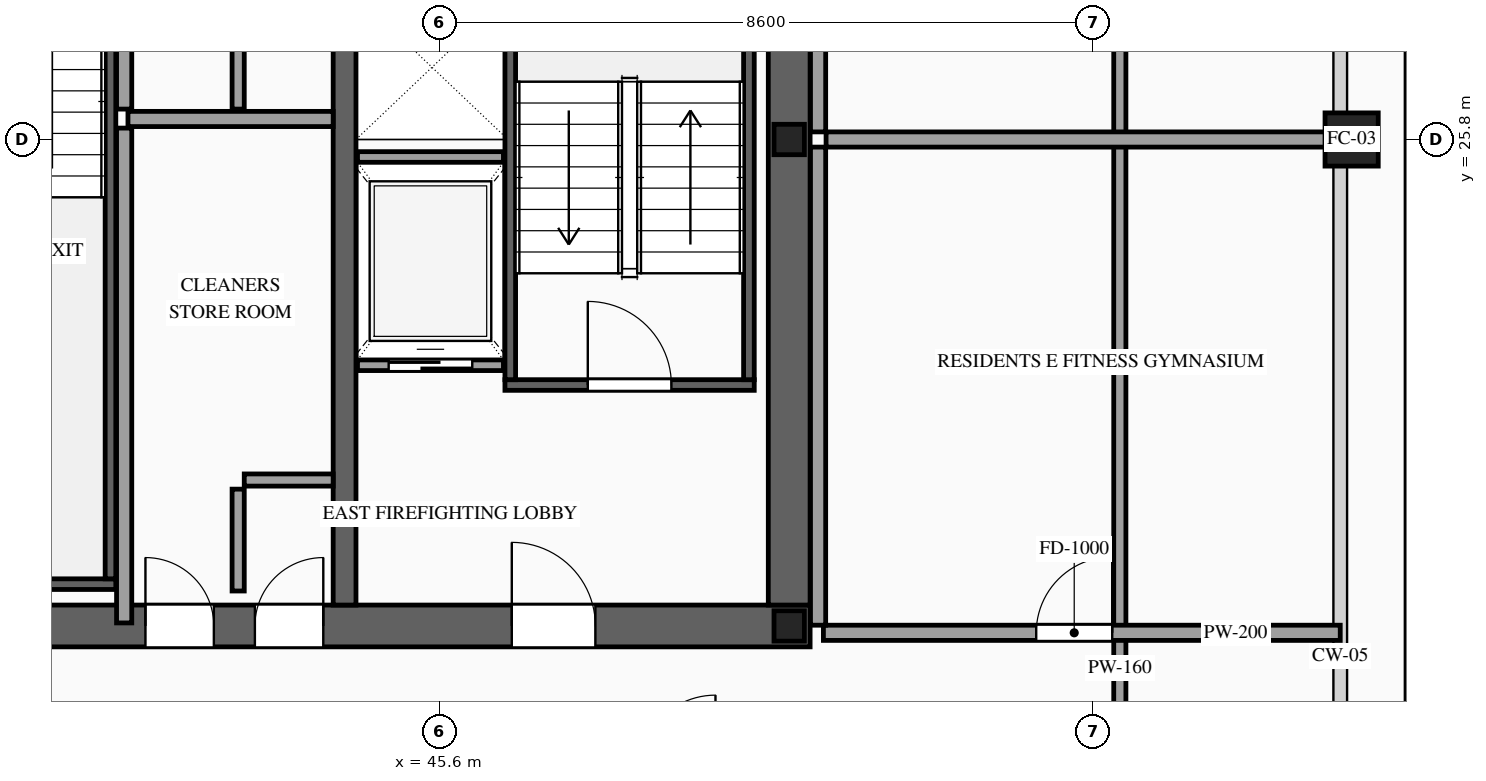
"""IFC4 building model, lengths in metres.
Left out: names, types, materials, properties, quantities, classifications, styles, units other than length and angle.
Written with IfcOpenShell. Run it as: python <this file> out.ifc"""

import sys

from ifc_helpers import new_model, si_unit, direction, frame, frame_2d, origin, origin_2d, place, context, subcontext, project, spatial, rectangle, hollow_rectangle, i_section, extrude, source, transform, mapped, element, fill, save


model = new_model("IFC4")
c1 = context("Model", 3, precision=1e-05, world=origin(), true_north=direction((0.0, 1.0)))
c2 = subcontext(c1, "Body", "Model", "MODEL_VIEW")
j1 = project(units=[si_unit("LENGTHUNIT", "METRE"), si_unit("PLANEANGLEUNIT", "RADIAN")], contexts=[c1])
p1 = place(None, origin())
s1 = spatial("IfcSite", under=j1, at=p1, CompositionType="ELEMENT")
p2 = place(p1, origin())
s2 = spatial("IfcBuilding", under=s1, at=p2, CompositionType="ELEMENT")
p3 = place(p2, frame((0.0, 0.0, 241.6)))
s3 = spatial("IfcBuildingStorey", under=s2, at=p3, CompositionType="ELEMENT", Elevation=241.6)
p4 = place(p3, frame((23.525, 19.4, 0.0), z_axis=(0.0, 0.0, 1.0), x_axis=(1.0, 0.0, 0.0)))
e1 = element("IfcWall", 1, at=p4, inside=s3, PredefinedType="SHEAR", context=c2, shape_type="SweptSolid", body=[
    extrude(rectangle(XDim=26.95, YDim=0.55, at=frame_2d((13.475, 0.0))), origin(), (0.0, 0.0, 1.0), 3.5),
])
p5 = place(p4, frame((1.925, 0.0, 0.0)))
e2 = element("IfcOpeningElement", 2, at=p5, cuts=e1, PredefinedType="OPENING", context=c2, shape_type="SweptSolid", body=[
    extrude(rectangle(XDim=1.1, YDim=2.2, at=frame_2d((0.55, 1.1))), frame((0.0, 0.29, 0.0), z_axis=(0.0, -1.0, 0.0), x_axis=(1.0, 0.0, 0.0)), (0.0, 0.0, 1.0), 0.58),
])
p6 = place(p4, frame((9.825, 0.0, 0.0)))
e3 = element("IfcOpeningElement", 3, at=p6, cuts=e1, PredefinedType="OPENING", context=c2, shape_type="SweptSolid", body=[
    extrude(rectangle(XDim=1.1, YDim=2.2, at=frame_2d((0.55, 1.1))), frame((0.0, 0.29, 0.0), z_axis=(0.0, -1.0, 0.0), x_axis=(1.0, 0.0, 0.0)), (0.0, 0.0, 1.0), 0.58),
])
p7 = place(p4, frame((23.025, 0.0, 0.0)))
e4 = element("IfcOpeningElement", 4, at=p7, cuts=e1, PredefinedType="OPENING", context=c2, shape_type="SweptSolid", body=[
    extrude(rectangle(XDim=1.1, YDim=2.2, at=frame_2d((0.55, 1.1))), frame((0.0, 0.29, 0.0), z_axis=(0.0, -1.0, 0.0), x_axis=(1.0, 0.0, 0.0)), (0.0, 0.0, 1.0), 0.58),
])
p8 = place(p4, frame((19.645, 0.0, 0.0)))
e5 = element("IfcOpeningElement", 5, at=p8, cuts=e1, PredefinedType="OPENING", context=c2, shape_type="SweptSolid", body=[
    extrude(rectangle(XDim=0.9, YDim=2.15, at=frame_2d((0.45, 1.075))), frame((0.0, 0.29, 0.0), z_axis=(0.0, -1.0, 0.0), x_axis=(1.0, 0.0, 0.0)), (0.0, 0.0, 1.0), 0.58),
])
p9 = place(p4, frame((18.205, 0.0, 0.0)))
e6 = element("IfcOpeningElement", 6, at=p9, cuts=e1, PredefinedType="OPENING", context=c2, shape_type="SweptSolid", body=[
    extrude(rectangle(XDim=0.9, YDim=2.15, at=frame_2d((0.45, 1.075))), frame((0.0, 0.29, 0.0), z_axis=(0.0, -1.0, 0.0), x_axis=(1.0, 0.0, 0.0)), (0.0, 0.0, 1.0), 0.58),
])
m1 = source(origin(), c2, "Body", "SweptSolid", [
    extrude(rectangle(XDim=12.25, YDim=0.55, at=frame_2d((6.125, 0.0))), origin(), (0.0, 0.0, 1.0), 3.5),
])
p10 = place(p3, frame((50.2, 19.675, 0.0), z_axis=(0.0, 0.0, 1.0), x_axis=(0.0, 1.0, 0.0)))
e7 = element("IfcWall", 7, at=p10, inside=s3, PredefinedType="SHEAR", context=c2, shape_type="MappedRepresentation", body=[
    mapped(m1, transform((0.0, 0.0, 0.0), scale=1.0)),
])
m2 = source(origin(), c2, "Body", "SweptSolid", [
    extrude(rectangle(XDim=12.25, YDim=0.3, at=frame_2d((6.125, 0.0))), origin(), (0.0, 0.0, 1.0), 3.5),
])
p11 = place(p3, frame((44.35, 19.675, 0.0), z_axis=(0.0, 0.0, 1.0), x_axis=(0.0, 1.0, 0.0)))
e8 = element("IfcWall", 8, at=p11, inside=s3, PredefinedType="SOLIDWALL", context=c2, shape_type="MappedRepresentation", body=[
    mapped(m2, transform((0.0, 0.0, 0.0), scale=1.0)),
])
m3 = source(origin(), c2, "Body", "SweptSolid", [
    extrude(i_section(OverallWidth=0.4, OverallDepth=0.4, WebThickness=0.013, FlangeThickness=0.021, at=origin_2d()), origin(), (0.0, 0.0, 1.0), 3.5),
])
for number, where, z_axis, x_axis in (
    (9, (50.2, 19.4, 0.0), (0.0, 0.0, 1.0), (1.0, 0.0, 0.0)),
    (10, (50.2, 25.8, 0.0), (0.0, 0.0, 1.0), (1.0, 0.0, 0.0)),
):
    element("IfcColumn", number, at=place(p3, frame(where, z_axis=z_axis, x_axis=x_axis)), inside=s3, PredefinedType="COLUMN", context=c2, shape_type="MappedRepresentation", body=[
        mapped(m3, transform((0.0, 0.0, 0.0), scale=1.0)),
    ])
m4 = source(origin(), c2, "Body", "SweptSolid", [
    extrude(hollow_rectangle(XDim=0.7, YDim=0.7, WallThickness=0.032, at=origin_2d()), origin(), (0.0, 0.0, 1.0), 3.5),
])
p12 = place(p3, frame((57.6, 25.8, 0.0), z_axis=(0.0, 0.0, 1.0), x_axis=(1.0, 0.0, 0.0)))
e11 = element("IfcColumn", 11, at=p12, inside=s3, PredefinedType="COLUMN", context=c2, shape_type="MappedRepresentation", body=[
    mapped(m4, transform((0.0, 0.0, 0.0), scale=1.0)),
])
p13 = place(p3, frame((44.52, 22.83, 0.0), z_axis=(0.0, 0.0, 1.0), x_axis=(1.0, 0.0, 0.0)))
e12 = element("IfcWall", 12, at=p13, inside=s3, PredefinedType="SOLIDWALL", context=c2, shape_type="SweptSolid", body=[
    extrude(rectangle(XDim=1.92, YDim=0.14, at=frame_2d((0.96, 0.0))), origin(), (0.0, 0.0, 1.0), 3.28),
])
p14 = place(p13, frame((0.41, 0.0, 0.0)))
e13 = element("IfcOpeningElement", 13, at=p14, cuts=e12, PredefinedType="OPENING", context=c2, shape_type="SweptSolid", body=[
    extrude(rectangle(XDim=1.1, YDim=2.2, at=frame_2d((0.55, 1.1))), frame((0.0, 0.085, 0.0), z_axis=(0.0, -1.0, 0.0), x_axis=(1.0, 0.0, 0.0)), (0.0, 0.0, 1.0), 0.17),
])
m5 = source(origin(), c2, "Body", "SweptSolid", [
    extrude(rectangle(XDim=1.92, YDim=0.14, at=frame_2d((0.96, 0.0))), origin(), (0.0, 0.0, 1.0), 3.28),
])
p15 = place(p3, frame((44.52, 25.57, 0.0), z_axis=(0.0, 0.0, 1.0), x_axis=(1.0, 0.0, 0.0)))
e14 = element("IfcWall", 14, at=p15, inside=s3, PredefinedType="SOLIDWALL", context=c2, shape_type="MappedRepresentation", body=[
    mapped(m5, transform((0.0, 0.0, 0.0), scale=1.0)),
])
p16 = place(p3, frame((46.46, 22.57, 0.0), z_axis=(0.0, 0.0, 1.0), x_axis=(1.0, 0.0, 0.0)))
e15 = element("IfcWall", 15, at=p16, inside=s3, PredefinedType="SOLIDWALL", context=c2, shape_type="SweptSolid", body=[
    extrude(rectangle(XDim=3.28, YDim=0.14, at=frame_2d((1.64, 0.0))), origin(), (0.0, 0.0, 1.0), 3.28),
])
p17 = place(p16, frame((1.09, 0.0, 0.0)))
e16 = element("IfcOpeningElement", 16, at=p17, cuts=e15, PredefinedType="OPENING", context=c2, shape_type="SweptSolid", body=[
    extrude(rectangle(XDim=1.1, YDim=2.2, at=frame_2d((0.55, 1.1))), frame((0.0, 0.085, 0.0), z_axis=(0.0, -1.0, 0.0), x_axis=(1.0, 0.0, 0.0)), (0.0, 0.0, 1.0), 0.17),
])
m6 = source(origin(), c2, "Body", "SweptSolid", [
    extrude(rectangle(XDim=8.94, YDim=0.14, at=frame_2d((4.47, 0.0))), origin(), (0.0, 0.0, 1.0), 3.28),
])
for number, where, z_axis, x_axis in (
    (17, (46.53, 22.64, 0.0), (0.0, 0.0, 1.0), (0.0, 1.0, 0.0)),
    (18, (49.67, 22.64, 0.0), (0.0, 0.0, 1.0), (0.0, 1.0, 0.0)),
):
    element("IfcWall", number, at=place(p3, frame(where, z_axis=z_axis, x_axis=x_axis)), inside=s3, PredefinedType="SOLIDWALL", context=c2, shape_type="MappedRepresentation", body=[
        mapped(m6, transform((0.0, 0.0, 0.0), scale=1.0)),
    ])
m7 = source(origin(), c2, "Body", "SweptSolid", [
    extrude(rectangle(XDim=3.14, YDim=0.14, at=frame_2d((1.57, 0.0))), origin(), (0.0, 0.0, 1.0), 3.28),
])
p18 = place(p3, frame((38.2, 19.95, 0.0), z_axis=(0.0, 0.0, 1.0), x_axis=(1.0, 0.0, 0.0)))
e19 = element("IfcWall", 19, at=p18, inside=s3, PredefinedType="SOLIDWALL", context=c2, shape_type="MappedRepresentation", body=[
    mapped(m7, transform((0.0, 0.0, 0.0), scale=1.0)),
])
m8 = source(origin(), c2, "Body", "SweptSolid", [
    extrude(rectangle(XDim=8.94, YDim=0.14, at=frame_2d((4.47, 0.0))), origin(), (0.0, 0.0, 1.0), 3.28),
])
p19 = place(p3, frame((41.27, 20.02, 0.0), z_axis=(0.0, 0.0, 1.0), x_axis=(0.0, 1.0, 0.0)))
e20 = element("IfcWall", 20, at=p19, inside=s3, PredefinedType="SOLIDWALL", context=c2, shape_type="MappedRepresentation", body=[
    mapped(m8, transform((0.0, 0.0, 0.0), scale=1.0)),
])
m9 = source(origin(), c2, "Body", "SweptSolid", [
    extrude(rectangle(XDim=1.34, YDim=0.16, at=frame_2d((0.67, 0.0))), origin(), (0.0, 0.0, 1.0), 3.28),
])
p20 = place(p3, frame((42.95, 19.86, 0.0), z_axis=(0.0, 0.0, 1.0), x_axis=(0.0, 1.0, 0.0)))
e21 = element("IfcWall", 21, at=p20, inside=s3, PredefinedType="PARTITIONING", context=c2, shape_type="MappedRepresentation", body=[
    mapped(m9, transform((0.0, 0.0, 0.0), scale=1.0)),
])
m10 = source(origin(), c2, "Body", "SweptSolid", [
    extrude(rectangle(XDim=1.17, YDim=0.16, at=frame_2d((0.585, 0.0))), origin(), (0.0, 0.0, 1.0), 3.28),
])
p21 = place(p3, frame((43.03, 21.32, 0.0), z_axis=(0.0, 0.0, 1.0), x_axis=(1.0, 0.0, 0.0)))
e22 = element("IfcWall", 22, at=p21, inside=s3, PredefinedType="PARTITIONING", context=c2, shape_type="MappedRepresentation", body=[
    mapped(m10, transform((0.0, 0.0, 0.0), scale=1.0)),
])
m11 = source(origin(), c2, "Body", "SweptSolid", [
    extrude(rectangle(XDim=6.51, YDim=0.2, at=frame_2d((3.255, 0.0))), origin(), (0.0, 0.0, 1.0), 3.28),
])
p22 = place(p3, frame((41.45, 19.44, 0.0), z_axis=(0.0, 0.0, 1.0), x_axis=(0.0, 1.0, 0.0)))
e23 = element("IfcWall", 23, at=p22, inside=s3, PredefinedType="PARTITIONING", context=c2, shape_type="MappedRepresentation", body=[
    mapped(m11, transform((0.0, 0.0, 0.0), scale=1.0)),
])
m12 = source(origin(), c2, "Body", "SweptSolid", [
    extrude(rectangle(XDim=2.7, YDim=0.2, at=frame_2d((1.35, 0.0))), origin(), (0.0, 0.0, 1.0), 3.28),
])
p23 = place(p3, frame((41.5, 26.07, 0.0), z_axis=(0.0, 0.0, 1.0), x_axis=(1.0, 0.0, 0.0)))
e24 = element("IfcWall", 24, at=p23, inside=s3, PredefinedType="PARTITIONING", context=c2, shape_type="MappedRepresentation", body=[
    mapped(m12, transform((0.0, 0.0, 0.0), scale=1.0)),
])
m13 = source(origin(), c2, "Body", "SweptSolid", [
    extrude(rectangle(XDim=5.96, YDim=0.2, at=frame_2d((2.98, 0.0))), origin(), (0.0, 0.0, 1.0), 3.28),
])
p24 = place(p3, frame((41.45, 26.2, 0.0), z_axis=(0.0, 0.0, 1.0), x_axis=(0.0, 1.0, 0.0)))
e25 = element("IfcWall", 25, at=p24, inside=s3, PredefinedType="PARTITIONING", context=c2, shape_type="MappedRepresentation", body=[
    mapped(m13, transform((0.0, 0.0, 0.0), scale=1.0)),
])
m14 = source(origin(), c2, "Body", "SweptSolid", [
    extrude(rectangle(XDim=5.96, YDim=0.16, at=frame_2d((2.98, 0.0))), origin(), (0.0, 0.0, 1.0), 3.28),
])
p25 = place(p3, frame((42.95, 26.2, 0.0), z_axis=(0.0, 0.0, 1.0), x_axis=(0.0, 1.0, 0.0)))
e26 = element("IfcWall", 26, at=p25, inside=s3, PredefinedType="PARTITIONING", context=c2, shape_type="MappedRepresentation", body=[
    mapped(m14, transform((0.0, 0.0, 0.0), scale=1.0)),
])
m15 = source(origin(), c2, "Body", "SweptSolid", [
    extrude(rectangle(XDim=26.69, YDim=0.16, at=frame_2d((13.345, 0.0))), origin(), (0.0, 0.0, 1.0), 3.28),
])
p26 = place(p3, frame((54.55, 5.5, 0.0), z_axis=(0.0, 0.0, 1.0), x_axis=(0.0, 1.0, 0.0)))
e27 = element("IfcWall", 27, at=p26, inside=s3, PredefinedType="PARTITIONING", context=c2, shape_type="MappedRepresentation", body=[
    mapped(m15, transform((0.0, 0.0, 0.0), scale=1.0)),
])
p27 = place(p3, frame((50.65, 19.31, 0.0), z_axis=(0.0, 0.0, 1.0), x_axis=(1.0, 0.0, 0.0)))
e28 = element("IfcWall", 28, at=p27, inside=s3, PredefinedType="PARTITIONING", context=c2, shape_type="SweptSolid", body=[
    extrude(rectangle(XDim=6.8, YDim=0.2, at=frame_2d((3.4, 0.0))), origin(), (0.0, 0.0, 1.0), 2.825),
])
p28 = place(p27, frame((2.8, 0.0, 0.0)))
e29 = element("IfcOpeningElement", 29, at=p28, cuts=e28, PredefinedType="OPENING", context=c2, shape_type="SweptSolid", body=[
    extrude(rectangle(XDim=1.0, YDim=2.2, at=frame_2d((0.5, 1.1))), frame((0.0, 0.115, 0.0), z_axis=(0.0, -1.0, 0.0), x_axis=(1.0, 0.0, 0.0)), (0.0, 0.0, 1.0), 0.23),
])
m16 = source(origin(), c2, "Body", "SweptSolid", [
    extrude(rectangle(XDim=6.765, YDim=0.2, at=frame_2d((3.382, 0.0))), origin(), (0.0, 0.0, 1.0), 2.787),
])
p29 = place(p3, frame((50.685, 25.8, 0.0), z_axis=(0.0, 0.0, 1.0), x_axis=(1.0, 0.0, 0.0)))
e30 = element("IfcWall", 30, at=p29, inside=s3, PredefinedType="PARTITIONING", context=c2, shape_type="MappedRepresentation", body=[
    mapped(m16, transform((0.0, 0.0, 0.0), scale=1.0)),
])
m17 = source(origin(), c2, "Body", "SweptSolid", [
    extrude(rectangle(XDim=6.29, YDim=0.2, at=frame_2d((3.145, 0.0))), origin(), (0.0, 0.0, 1.0), 3.28),
])
for number, where, z_axis, x_axis in (
    (31, (50.58, 19.41, 0.0), (0.0, 0.0, 1.0), (0.0, 1.0, 0.0)),
    (32, (50.58, 25.9, 0.0), (0.0, 0.0, 1.0), (0.0, 1.0, 0.0)),
):
    element("IfcWall", number, at=place(p3, frame(where, z_axis=z_axis, x_axis=x_axis)), inside=s3, PredefinedType="PARTITIONING", context=c2, shape_type="MappedRepresentation", body=[
        mapped(m17, transform((0.0, 0.0, 0.0), scale=1.0)),
    ])
m18 = source(origin(), c2, "Body", "SweptSolid", [
    extrude(rectangle(XDim=1.1, YDim=2.2, at=frame_2d((0.55, 1.1))), frame((0.0, 0.025, 0.0), z_axis=(0.0, -1.0, 0.0), x_axis=(1.0, 0.0, 0.0)), (0.0, 0.0, 1.0), 0.05),
])
p30 = place(p14, origin())
e33 = element("IfcDoor", 33, at=p30, inside=s3, OperationType="SLIDING_TO_RIGHT", PredefinedType="DOOR", context=c2, shape_type="MappedRepresentation", body=[
    mapped(m18, transform((0.0, 0.0, 0.0), scale=1.0)),
])
fill(e13, e33)
m19 = source(origin(), c2, "Body", "SweptSolid", [
    extrude(rectangle(XDim=1.1, YDim=2.2, at=frame_2d((0.55, 1.1))), frame((0.0, 0.025, 0.0), z_axis=(0.0, -1.0, 0.0), x_axis=(1.0, 0.0, 0.0)), (0.0, 0.0, 1.0), 0.05),
])
p31 = place(p17, origin())
e34 = element("IfcDoor", 34, at=p31, inside=s3, OperationType="SINGLE_SWING_LEFT", PredefinedType="DOOR", context=c2, shape_type="MappedRepresentation", body=[
    mapped(m19, transform((0.0, 0.0, 0.0), scale=1.0)),
])
fill(e16, e34)
p32 = place(p7, origin())
e35 = element("IfcDoor", 35, at=p32, inside=s3, OperationType="SINGLE_SWING_LEFT", PredefinedType="DOOR", context=c2, shape_type="MappedRepresentation", body=[
    mapped(m19, transform((0.0, 0.0, 0.0), scale=1.0)),
])
fill(e4, e35)
m20 = source(origin(), c2, "Body", "SweptSolid", [
    extrude(rectangle(XDim=0.9, YDim=2.15, at=frame_2d((0.45, 1.075))), frame((0.0, 0.025, 0.0), z_axis=(0.0, -1.0, 0.0), x_axis=(1.0, 0.0, 0.0)), (0.0, 0.0, 1.0), 0.05),
])
p33 = place(p8, origin())
e36 = element("IfcDoor", 36, at=p33, inside=s3, OperationType="SINGLE_SWING_RIGHT", PredefinedType="DOOR", context=c2, shape_type="MappedRepresentation", body=[
    mapped(m20, transform((0.0, 0.0, 0.0), scale=1.0)),
])
fill(e5, e36)
p34 = place(p9, origin())
e37 = element("IfcDoor", 37, at=p34, inside=s3, OperationType="SINGLE_SWING_LEFT", PredefinedType="DOOR", context=c2, shape_type="MappedRepresentation", body=[
    mapped(m20, transform((0.0, 0.0, 0.0), scale=1.0)),
])
fill(e6, e37)
m21 = source(origin(), c2, "Body", "SweptSolid", [
    extrude(rectangle(XDim=1.0, YDim=2.2, at=frame_2d((0.5, 1.1))), frame((0.0, 0.025, 0.0), z_axis=(0.0, -1.0, 0.0), x_axis=(1.0, 0.0, 0.0)), (0.0, 0.0, 1.0), 0.05),
])
p35 = place(p28, origin())
e38 = element("IfcDoor", 38, at=p35, inside=s3, OperationType="SINGLE_SWING_RIGHT", PredefinedType="DOOR", context=c2, shape_type="MappedRepresentation", body=[
    mapped(m21, transform((0.0, 0.0, 0.0), scale=1.0)),
])
fill(e29, e38)
save(model, sys.argv[1])
